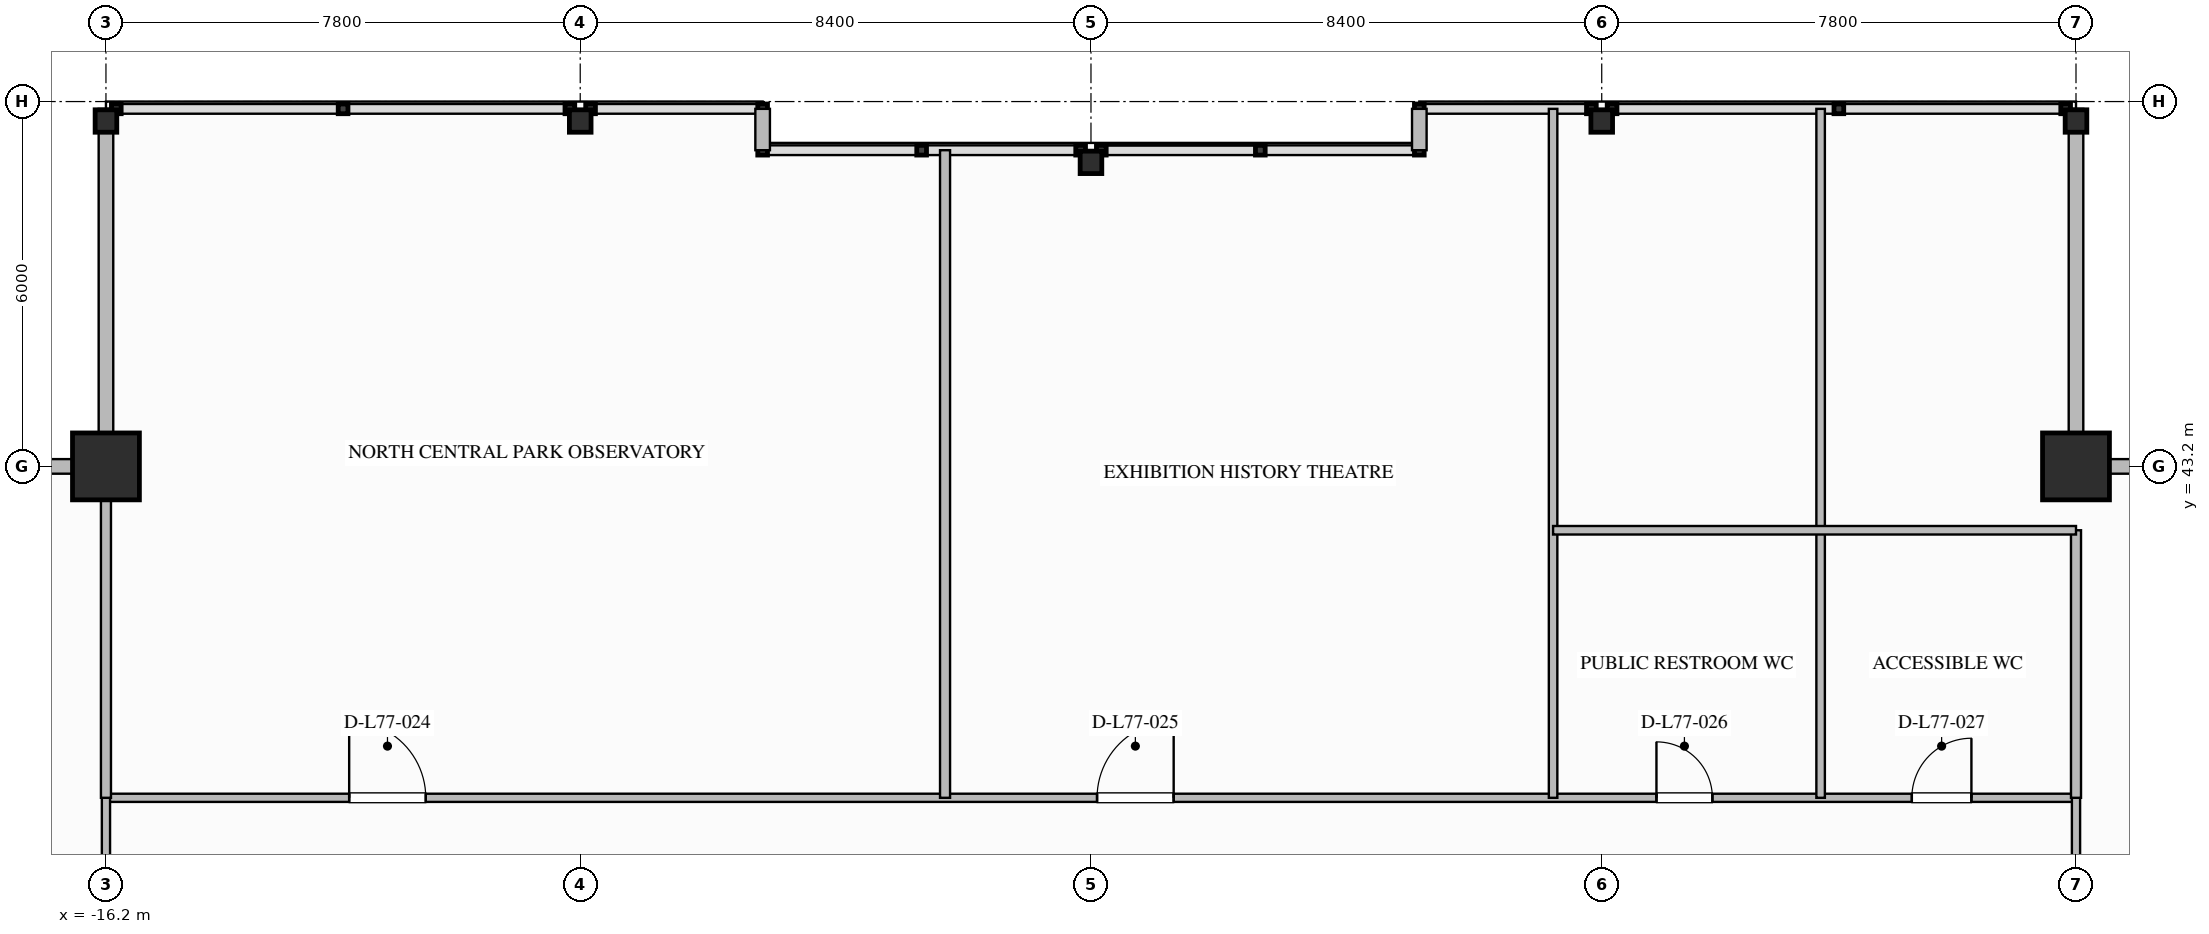
"""IFC4 building model, lengths in metres.
Left out: names, types, materials, properties, quantities, classifications, styles, units other than length and angle.
Written with IfcOpenShell. Run it as: python <this file> out.ifc"""

import sys

from ifc_helpers import new_model, si_unit, direction, frame, frame_2d, origin, origin_2d, place, context, subcontext, project, spatial, rectangle, i_section, extrude, element, fill, save


model = new_model("IFC4")
c1 = context("Model", 3, precision=1e-05, world=origin(), true_north=direction((0.0, 1.0)))
c2 = subcontext(c1, "Body", "Model", "MODEL_VIEW")
j1 = project(units=[si_unit("LENGTHUNIT", "METRE"), si_unit("PLANEANGLEUNIT", "RADIAN")], contexts=[c1])
p1 = place(None, origin())
s1 = spatial("IfcSite", under=j1, at=p1, CompositionType="ELEMENT")
p2 = place(p1, origin())
s2 = spatial("IfcBuilding", under=s1, at=p2, CompositionType="ELEMENT")
p3 = place(p2, frame((0.0, 0.0, 294.2)))
s3 = spatial("IfcBuildingStorey", under=s2, at=p3, CompositionType="ELEMENT", Elevation=294.2)
for number, where, z_axis, x_axis in (
    (1, (-16.2, 43.2, 0.0), (0.0, 0.0, 1.0), (1.0, 0.0, 0.0)),
    (2, (16.2, 43.2, 0.0), (0.0, 0.0, 1.0), (1.0, 0.0, 0.0)),
):
    element("IfcColumn", number, at=place(p3, frame(where, z_axis=z_axis, x_axis=x_axis)), inside=s3, PredefinedType="COLUMN", context=c2, shape_type="SweptSolid", body=[
        extrude(rectangle(XDim=1.1, YDim=1.1, at=origin_2d()), origin(), (0.0, 0.0, 1.0), 4.4),
    ])
for number, where, z_axis, x_axis in (
    (3, (-16.2, 48.88, 0.0), (0.0, 0.0, 1.0), (0.0, 1.0, 0.0)),
    (4, (-8.4, 48.88, 0.0), (0.0, 0.0, 1.0), (0.0, 1.0, 0.0)),
    (5, (0.0, 48.2, 0.0), (0.0, 0.0, 1.0), (0.0, 1.0, 0.0)),
    (6, (8.4, 48.88, 0.0), (0.0, 0.0, 1.0), (0.0, 1.0, 0.0)),
    (7, (16.2, 48.88, 0.0), (0.0, 0.0, 1.0), (0.0, 1.0, 0.0)),
):
    element("IfcColumn", number, at=place(p3, frame(where, z_axis=z_axis, x_axis=x_axis)), inside=s3, PredefinedType="COLUMN", context=c2, shape_type="SweptSolid", body=[
        extrude(i_section(OverallWidth=0.369, OverallDepth=0.356, WebThickness=0.011, FlangeThickness=0.018, FilletRadius=0.025, at=origin_2d()), origin(), (0.0, 0.0, 1.0), 4.397),
    ])
for number, where, z_axis, x_axis in (
    (8, (-22.08, 43.2, 0.0), (0.0, 0.0, 1.0), (1.0, 0.0, 0.0)),
    (9, (-16.2, 43.2, 0.0), (0.0, 0.0, 1.0), (0.0, 1.0, 0.0)),
    (10, (16.2, 49.08, 0.0), (0.0, 0.0, 1.0), (0.0, -1.0, 0.0)),
    (11, (16.2, 43.2, 0.0), (0.0, 0.0, 1.0), (1.0, 0.0, 0.0)),
):
    element("IfcWall", number, at=place(p3, frame(where, z_axis=z_axis, x_axis=x_axis)), inside=s3, PredefinedType="STANDARD", context=c2, shape_type="SweptSolid", body=[
        extrude(rectangle(XDim=5.88, YDim=0.24, at=frame_2d((2.94, 0.0))), origin(), (0.0, 0.0, 1.0), 3.489),
    ])
for number, where, z_axis, x_axis in (
    (12, (-5.4, 49.08, 0.0), (0.0, 0.0, 1.0), (0.0, -1.0, 0.0)),
    (13, (5.4, 48.4, 0.0), (0.0, 0.0, 1.0), (0.0, 1.0, 0.0)),
):
    element("IfcWall", number, at=place(p3, frame(where, z_axis=z_axis, x_axis=x_axis)), inside=s3, PredefinedType="STANDARD", context=c2, shape_type="SweptSolid", body=[
        extrude(rectangle(XDim=0.68, YDim=0.24, at=frame_2d((0.34, 0.0))), origin(), (0.0, 0.0, 1.0), 4.1),
    ])
p4 = place(p3, frame((-16.2, 37.75, 0.0), z_axis=(0.0, 0.0, 1.0), x_axis=(1.0, 0.0, 0.0)))
e14 = element("IfcWall", 14, at=p4, inside=s3, PredefinedType="PARTITIONING", context=c2, shape_type="SweptSolid", body=[
    extrude(rectangle(XDim=32.4, YDim=0.135, at=frame_2d((16.2, 0.0))), origin(), (0.0, 0.0, 1.0), 4.1),
])
p5 = place(p4, frame((4.0, 0.0, 0.0)))
e15 = element("IfcOpeningElement", 15, at=p5, cuts=e14, PredefinedType="OPENING", context=c2, shape_type="SweptSolid", body=[
    extrude(rectangle(XDim=1.26, YDim=2.2, at=frame_2d((0.63, 1.1))), frame((0.0, 0.077, 0.0), z_axis=(0.0, -1.0, 0.0), x_axis=(1.0, 0.0, 0.0)), (0.0, 0.0, 1.0), 0.155),
])
p6 = place(p4, frame((16.3, 0.0, 0.0)))
e16 = element("IfcOpeningElement", 16, at=p6, cuts=e14, PredefinedType="OPENING", context=c2, shape_type="SweptSolid", body=[
    extrude(rectangle(XDim=1.26, YDim=2.2, at=frame_2d((0.63, 1.1))), frame((0.0, 0.077, 0.0), z_axis=(0.0, -1.0, 0.0), x_axis=(1.0, 0.0, 0.0)), (0.0, 0.0, 1.0), 0.155),
])
p7 = place(p4, frame((25.5, 0.0, 0.0)))
e17 = element("IfcOpeningElement", 17, at=p7, cuts=e14, PredefinedType="OPENING", context=c2, shape_type="SweptSolid", body=[
    extrude(rectangle(XDim=0.92, YDim=2.1, at=frame_2d((0.46, 1.05))), frame((0.0, 0.077, 0.0), z_axis=(0.0, -1.0, 0.0), x_axis=(1.0, 0.0, 0.0)), (0.0, 0.0, 1.0), 0.155),
])
p8 = place(p4, frame((29.7, 0.0, 0.0)))
e18 = element("IfcOpeningElement", 18, at=p8, cuts=e14, PredefinedType="OPENING", context=c2, shape_type="SweptSolid", body=[
    extrude(rectangle(XDim=0.98, YDim=2.1, at=frame_2d((0.49, 1.05))), frame((0.0, 0.077, 0.0), z_axis=(0.0, -1.0, 0.0), x_axis=(1.0, 0.0, 0.0)), (0.0, 0.0, 1.0), 0.155),
])
for number, where, z_axis, x_axis in (
    (19, (-16.2, 35.6, 0.0), (0.0, 0.0, 1.0), (0.0, 1.0, 0.0)),
    (20, (16.2, 35.6, 0.0), (0.0, 0.0, 1.0), (0.0, 1.0, 0.0)),
):
    element("IfcWall", number, at=place(p3, frame(where, z_axis=z_axis, x_axis=x_axis)), inside=s3, PredefinedType="PARTITIONING", context=c2, shape_type="SweptSolid", body=[
        extrude(rectangle(XDim=2.15, YDim=0.135, at=frame_2d((1.075, 0.0))), origin(), (0.0, 0.0, 1.0), 3.474),
    ])
p9 = place(p3, frame((-16.2, 37.75, 0.0), z_axis=(0.0, 0.0, 1.0), x_axis=(0.0, 1.0, 0.0)))
e21 = element("IfcWall", 21, at=p9, inside=s3, PredefinedType="PARTITIONING", context=c2, shape_type="SweptSolid", body=[
    extrude(rectangle(XDim=5.33, YDim=0.165, at=frame_2d((2.665, 0.0))), origin(), (0.0, 0.0, 1.0), 3.474),
])
p10 = place(p3, frame((16.2, 37.75, 0.0), z_axis=(0.0, 0.0, 1.0), x_axis=(0.0, 1.0, 0.0)))
e22 = element("IfcWall", 22, at=p10, inside=s3, PredefinedType="PARTITIONING", context=c2, shape_type="SweptSolid", body=[
    extrude(rectangle(XDim=4.4, YDim=0.165, at=frame_2d((2.2, 0.0))), origin(), (0.0, 0.0, 1.0), 3.474),
])
p11 = place(p3, frame((-2.4, 37.75, 0.0), z_axis=(0.0, 0.0, 1.0), x_axis=(0.0, 1.0, 0.0)))
e23 = element("IfcWall", 23, at=p11, inside=s3, PredefinedType="PARTITIONING", context=c2, shape_type="SweptSolid", body=[
    extrude(rectangle(XDim=10.65, YDim=0.165, at=frame_2d((5.325, 0.0))), origin(), (0.0, 0.0, 1.0), 4.1),
])
for number, where, z_axis, x_axis in (
    (24, (7.6, 37.75, 0.0), (0.0, 0.0, 1.0), (0.0, 1.0, 0.0)),
    (25, (12.0, 37.75, 0.0), (0.0, 0.0, 1.0), (0.0, 1.0, 0.0)),
):
    element("IfcWall", number, at=place(p3, frame(where, z_axis=z_axis, x_axis=x_axis)), inside=s3, PredefinedType="PLUMBINGWALL", context=c2, shape_type="SweptSolid", body=[
        extrude(rectangle(XDim=11.33, YDim=0.14, at=frame_2d((5.665, 0.0))), origin(), (0.0, 0.0, 1.0), 4.1),
    ])
p12 = place(p3, frame((7.6, 42.15, 0.0), z_axis=(0.0, 0.0, 1.0), x_axis=(1.0, 0.0, 0.0)))
e26 = element("IfcWall", 26, at=p12, inside=s3, PredefinedType="PLUMBINGWALL", context=c2, shape_type="SweptSolid", body=[
    extrude(rectangle(XDim=8.6, YDim=0.14, at=frame_2d((4.3, 0.0))), origin(), (0.0, 0.0, 1.0), 4.1),
])
p13 = place(p5, origin())
e27 = element("IfcDoor", 27, at=p13, inside=s3, OperationType="SINGLE_SWING_LEFT", PredefinedType="DOOR", context=c2, shape_type="SweptSolid", body=[
    extrude(rectangle(XDim=1.26, YDim=2.2, at=frame_2d((0.63, 1.1))), frame((0.0, 0.025, 0.0), z_axis=(0.0, -1.0, 0.0), x_axis=(1.0, 0.0, 0.0)), (0.0, 0.0, 1.0), 0.05),
])
fill(e15, e27)
p14 = place(p6, origin())
e28 = element("IfcDoor", 28, at=p14, inside=s3, OperationType="SINGLE_SWING_RIGHT", PredefinedType="DOOR", context=c2, shape_type="SweptSolid", body=[
    extrude(rectangle(XDim=1.26, YDim=2.2, at=frame_2d((0.63, 1.1))), frame((0.0, 0.025, 0.0), z_axis=(0.0, -1.0, 0.0), x_axis=(1.0, 0.0, 0.0)), (0.0, 0.0, 1.0), 0.05),
])
fill(e16, e28)
p15 = place(p7, origin())
e29 = element("IfcDoor", 29, at=p15, inside=s3, OperationType="SINGLE_SWING_LEFT", PredefinedType="DOOR", context=c2, shape_type="SweptSolid", body=[
    extrude(rectangle(XDim=0.92, YDim=2.1, at=frame_2d((0.46, 1.05))), frame((0.0, 0.025, 0.0), z_axis=(0.0, -1.0, 0.0), x_axis=(1.0, 0.0, 0.0)), (0.0, 0.0, 1.0), 0.05),
])
fill(e17, e29)
p16 = place(p8, origin())
e30 = element("IfcDoor", 30, at=p16, inside=s3, OperationType="SINGLE_SWING_RIGHT", PredefinedType="DOOR", context=c2, shape_type="SweptSolid", body=[
    extrude(rectangle(XDim=0.98, YDim=2.1, at=frame_2d((0.49, 1.05))), frame((0.0, 0.025, 0.0), z_axis=(0.0, -1.0, 0.0), x_axis=(1.0, 0.0, 0.0)), (0.0, 0.0, 1.0), 0.05),
])
fill(e18, e30)
save(model, sys.argv[1])
